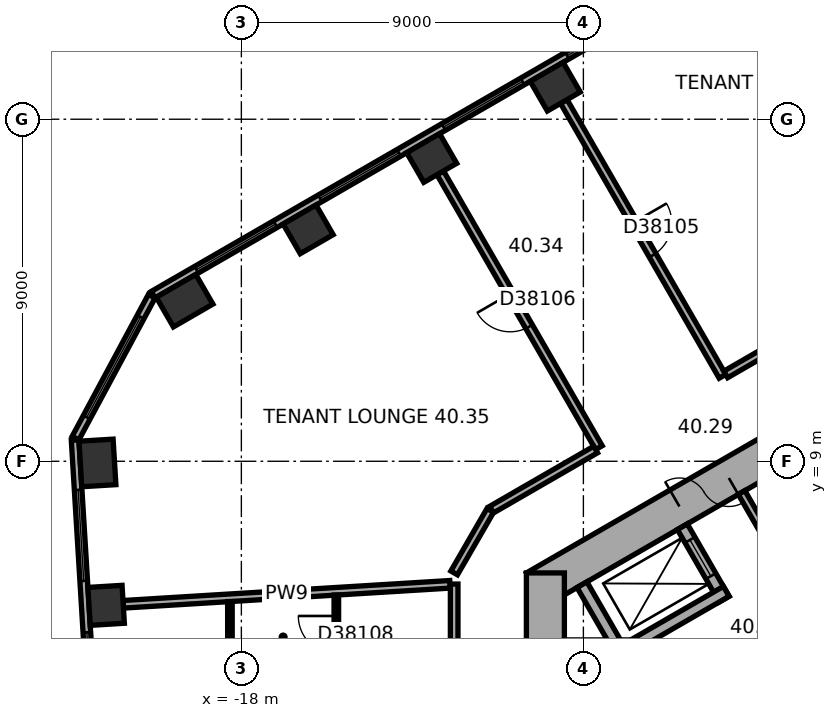
"""IFC4 building model, lengths in metres.
Left out: names, types, materials, properties, quantities, classifications, styles, units other than length and angle.
Written with IfcOpenShell. Run it as: python <this file> out.ifc"""

import sys

from ifc_helpers import new_model, si_unit, direction, frame, frame_2d, origin, origin_2d, place, context, subcontext, project, spatial, rectangle, extrude, element, fill, save


model = new_model("IFC4")
c1 = context("Model", 3, precision=1e-05, world=origin(), true_north=direction((0.0, 1.0)))
c2 = subcontext(c1, "Body", "Model", "MODEL_VIEW")
j1 = project(units=[si_unit("LENGTHUNIT", "METRE"), si_unit("PLANEANGLEUNIT", "RADIAN")], contexts=[c1])
p1 = place(None, origin())
s1 = spatial("IfcSite", under=j1, at=p1, CompositionType="ELEMENT")
p2 = place(p1, origin())
s2 = spatial("IfcBuilding", under=s1, at=p2, CompositionType="ELEMENT")
p3 = place(p2, frame((0.0, 0.0, 165.1)))
s3 = spatial("IfcBuildingStorey", under=s2, at=p3, CompositionType="ELEMENT", Elevation=165.1)
for number, where, z_axis, x_axis in (
    (1, (-9.74, 18.856, 0.0), (0.0, 0.0, 1.0), (-0.866, -0.5, 0.0)),
    (2, (-12.991, 16.979, 0.0), (0.0, 0.0, 1.0), (-0.866, -0.5, 0.0)),
    (3, (-16.242, 15.102, 0.0), (0.0, 0.0, 1.0), (-0.866, -0.5, 0.0)),
):
    element("IfcColumn", number, at=place(p3, frame(where, z_axis=z_axis, x_axis=x_axis)), inside=s3, PredefinedType="COLUMN", context=c2, shape_type="SweptSolid", body=[
        extrude(rectangle(XDim=1.0, YDim=0.9, at=origin_2d()), origin(), (0.0, 0.0, 1.0), 3.7),
    ])
for number, where, z_axis, x_axis in (
    (4, (-19.494, 13.225, 0.0), (0.0, 0.0, 1.0), (-0.866, -0.5, 0.0)),
    (5, (-21.787, 8.956, 0.0), (0.0, 0.0, 1.0), (0.061, -0.998, 0.0)),
):
    element("IfcColumn", number, at=place(p3, frame(where, z_axis=z_axis, x_axis=x_axis)), inside=s3, PredefinedType="COLUMN", context=c2, shape_type="SweptSolid", body=[
        extrude(rectangle(XDim=1.2, YDim=0.9, at=origin_2d()), origin(), (0.0, 0.0, 1.0), 3.7),
    ])
p4 = place(p3, frame((-21.558, 5.209, 0.0), z_axis=(0.0, 0.0, 1.0), x_axis=(0.061048539535, -0.998134798422, 0.0)))
e6 = element("IfcColumn", 6, at=p4, inside=s3, PredefinedType="COLUMN", context=c2, shape_type="SweptSolid", body=[
    extrude(rectangle(XDim=1.0, YDim=0.9, at=origin_2d()), origin(), (0.0, 0.0, 1.0), 3.7),
])
p5 = place(p3, frame((0.25, 11.691, 0.0), z_axis=(0.0, 0.0, 1.0), x_axis=(-0.866022616891, -0.50000482701, 0.0)))
e7 = element("IfcWall", 7, at=p5, inside=s3, PredefinedType="SHEAR", context=c2, shape_type="SweptSolid", body=[
    extrude(rectangle(XDim=12.125, YDim=1.0, at=frame_2d((6.062, 0.0))), origin(), (0.0, 0.0, 1.0), 3.7),
])
p6 = place(p5, frame((6.262, 0.0, 0.0)))
e8 = element("IfcOpeningElement", 8, at=p6, cuts=e7, PredefinedType="OPENING", context=c2, shape_type="SweptSolid", body=[
    extrude(rectangle(XDim=1.5, YDim=2.1, at=frame_2d((0.75, 1.05))), frame((0.0, 0.51, 0.0), z_axis=(0.0, -1.0, 0.0), x_axis=(1.0, 0.0, 0.0)), (0.0, 0.0, 1.0), 1.02),
])
p7 = place(p5, frame((3.112, 0.0, 0.0)))
e9 = element("IfcOpeningElement", 9, at=p7, cuts=e7, PredefinedType="OPENING", context=c2, shape_type="SweptSolid", body=[
    extrude(rectangle(XDim=0.9, YDim=2.1, at=frame_2d((0.45, 1.05))), frame((0.0, 0.51, 0.0), z_axis=(0.0, -1.0, 0.0), x_axis=(1.0, 0.0, 0.0)), (0.0, 0.0, 1.0), 1.02),
])
p8 = place(p3, frame((-10.0, 6.062, 0.0), z_axis=(0.0, 0.0, 1.0), x_axis=(0.0, -1.0, 0.0)))
e10 = element("IfcWall", 10, at=p8, inside=s3, PredefinedType="SHEAR", context=c2, shape_type="SweptSolid", body=[
    extrude(rectangle(XDim=12.125, YDim=1.0, at=frame_2d((6.062, 0.0))), origin(), (0.0, 0.0, 1.0), 3.7),
])
p9 = place(p8, frame((5.212, 0.0, 0.0)))
e11 = element("IfcOpeningElement", 11, at=p9, cuts=e10, PredefinedType="OPENING", context=c2, shape_type="SweptSolid", body=[
    extrude(rectangle(XDim=1.1, YDim=2.1, at=frame_2d((0.55, 1.05))), frame((0.0, 0.51, 0.0), z_axis=(0.0, -1.0, 0.0), x_axis=(1.0, 0.0, 0.0)), (0.0, 0.0, 1.0), 1.02),
])
p10 = place(p8, frame((7.812, 0.0, 0.0)))
e12 = element("IfcOpeningElement", 12, at=p10, cuts=e10, PredefinedType="OPENING", context=c2, shape_type="SweptSolid", body=[
    extrude(rectangle(XDim=1.1, YDim=2.1, at=frame_2d((0.55, 1.05))), frame((0.0, 0.51, 0.0), z_axis=(0.0, -1.0, 0.0), x_axis=(1.0, 0.0, 0.0)), (0.0, 0.0, 1.0), 1.02),
])
p11 = place(p3, frame((-2.961, 23.405, 0.0), z_axis=(0.0, 0.0, 1.0), x_axis=(-0.866023315909, -0.500003616288, 0.0)))
e13 = element("IfcWall", 13, at=p11, inside=s3, PredefinedType="STANDARD", context=c2, shape_type="SweptSolid", body=[
    extrude(rectangle(XDim=20.044, YDim=0.2, at=frame_2d((10.022, 0.0))), origin(), (0.0, 0.0, 1.0), 3.7),
])
p12 = place(p11, frame((1.314, 0.0, 0.9)))
e14 = element("IfcOpeningElement", 14, at=p12, cuts=e13, PredefinedType="OPENING", context=c2, shape_type="SweptSolid", body=[
    extrude(rectangle(XDim=2.4, YDim=2.0, at=frame_2d((1.2, 1.0))), frame((0.0, 0.11, 0.0), z_axis=(0.0, -1.0, 0.0), x_axis=(1.0, 0.0, 0.0)), (0.0, 0.0, 1.0), 0.22),
])
p13 = place(p11, frame((5.069, 0.0, 0.9)))
e15 = element("IfcOpeningElement", 15, at=p13, cuts=e13, PredefinedType="OPENING", context=c2, shape_type="SweptSolid", body=[
    extrude(rectangle(XDim=2.4, YDim=2.0, at=frame_2d((1.2, 1.0))), frame((0.0, 0.11, 0.0), z_axis=(0.0, -1.0, 0.0), x_axis=(1.0, 0.0, 0.0)), (0.0, 0.0, 1.0), 0.22),
])
p14 = place(p11, frame((8.823, 0.0, 0.9)))
e16 = element("IfcOpeningElement", 16, at=p14, cuts=e13, PredefinedType="OPENING", context=c2, shape_type="SweptSolid", body=[
    extrude(rectangle(XDim=2.4, YDim=2.0, at=frame_2d((1.2, 1.0))), frame((0.0, 0.11, 0.0), z_axis=(0.0, -1.0, 0.0), x_axis=(1.0, 0.0, 0.0)), (0.0, 0.0, 1.0), 0.22),
])
p15 = place(p11, frame((12.577, 0.0, 0.9)))
e17 = element("IfcOpeningElement", 17, at=p15, cuts=e13, PredefinedType="OPENING", context=c2, shape_type="SweptSolid", body=[
    extrude(rectangle(XDim=2.4, YDim=2.0, at=frame_2d((1.2, 1.0))), frame((0.0, 0.11, 0.0), z_axis=(0.0, -1.0, 0.0), x_axis=(1.0, 0.0, 0.0)), (0.0, 0.0, 1.0), 0.22),
])
p16 = place(p11, frame((16.331, 0.0, 0.9)))
e18 = element("IfcOpeningElement", 18, at=p16, cuts=e13, PredefinedType="OPENING", context=c2, shape_type="SweptSolid", body=[
    extrude(rectangle(XDim=2.4, YDim=2.0, at=frame_2d((1.2, 1.0))), frame((0.0, 0.11, 0.0), z_axis=(0.0, -1.0, 0.0), x_axis=(1.0, 0.0, 0.0)), (0.0, 0.0, 1.0), 0.22),
])
p17 = place(p3, frame((-20.357, 13.344, 0.0), z_axis=(0.0, 0.0, 1.0), x_axis=(-0.473288913494, -0.880907262068, 0.0)))
e19 = element("IfcWall", 19, at=p17, inside=s3, PredefinedType="STANDARD", context=c2, shape_type="SweptSolid", body=[
    extrude(rectangle(XDim=4.238, YDim=0.2, at=frame_2d((2.119, 0.0))), origin(), (0.0, 0.0, 1.0), 3.7),
])
p18 = place(p17, frame((0.619, 0.0, 0.9)))
e20 = element("IfcOpeningElement", 20, at=p18, cuts=e19, PredefinedType="OPENING", context=c2, shape_type="SweptSolid", body=[
    extrude(rectangle(XDim=3.0, YDim=2.0, at=frame_2d((1.5, 1.0))), frame((0.0, 0.11, 0.0), z_axis=(0.0, -1.0, 0.0), x_axis=(1.0, 0.0, 0.0)), (0.0, 0.0, 1.0), 0.22),
])
p19 = place(p3, frame((-22.375, 9.557, 0.0), z_axis=(0.0, 0.0, 1.0), x_axis=(0.061036015339, -0.998135564356, 0.0)))
e21 = element("IfcWall", 21, at=p19, inside=s3, PredefinedType="STANDARD", context=c2, shape_type="SweptSolid", body=[
    extrude(rectangle(XDim=20.044, YDim=0.2, at=frame_2d((10.022, 0.0))), origin(), (0.0, 0.0, 1.0), 3.7),
])
p20 = place(p19, frame((1.313, 0.0, 0.9)))
e22 = element("IfcOpeningElement", 22, at=p20, cuts=e21, PredefinedType="OPENING", context=c2, shape_type="SweptSolid", body=[
    extrude(rectangle(XDim=2.4, YDim=2.0, at=frame_2d((1.2, 1.0))), frame((0.0, 0.11, 0.0), z_axis=(0.0, -1.0, 0.0), x_axis=(1.0, 0.0, 0.0)), (0.0, 0.0, 1.0), 0.22),
])
p21 = place(p19, frame((5.067, 0.0, 0.9)))
e23 = element("IfcOpeningElement", 23, at=p21, cuts=e21, PredefinedType="OPENING", context=c2, shape_type="SweptSolid", body=[
    extrude(rectangle(XDim=2.4, YDim=2.0, at=frame_2d((1.2, 1.0))), frame((0.0, 0.11, 0.0), z_axis=(0.0, -1.0, 0.0), x_axis=(1.0, 0.0, 0.0)), (0.0, 0.0, 1.0), 0.22),
])
p22 = place(p19, frame((8.821, 0.0, 0.9)))
e24 = element("IfcOpeningElement", 24, at=p22, cuts=e21, PredefinedType="OPENING", context=c2, shape_type="SweptSolid", body=[
    extrude(rectangle(XDim=2.4, YDim=2.0, at=frame_2d((1.2, 1.0))), frame((0.0, 0.11, 0.0), z_axis=(0.0, -1.0, 0.0), x_axis=(1.0, 0.0, 0.0)), (0.0, 0.0, 1.0), 0.22),
])
p23 = place(p19, frame((12.575, 0.0, 0.9)))
e25 = element("IfcOpeningElement", 25, at=p23, cuts=e21, PredefinedType="OPENING", context=c2, shape_type="SweptSolid", body=[
    extrude(rectangle(XDim=2.4, YDim=2.0, at=frame_2d((1.2, 1.0))), frame((0.0, 0.11, 0.0), z_axis=(0.0, -1.0, 0.0), x_axis=(1.0, 0.0, 0.0)), (0.0, 0.0, 1.0), 0.22),
])
p24 = place(p19, frame((16.329, 0.0, 0.9)))
e26 = element("IfcOpeningElement", 26, at=p24, cuts=e21, PredefinedType="OPENING", context=c2, shape_type="SweptSolid", body=[
    extrude(rectangle(XDim=2.4, YDim=2.0, at=frame_2d((1.2, 1.0))), frame((0.0, 0.11, 0.0), z_axis=(0.0, -1.0, 0.0), x_axis=(1.0, 0.0, 0.0)), (0.0, 0.0, 1.0), 0.22),
])
p25 = place(p3, frame((-3.737, 6.272, 0.0), z_axis=(0.0, 0.0, 1.0), x_axis=(-0.50002983664, 0.866008176907, 0.0)))
e27 = element("IfcWall", 27, at=p25, inside=s3, PredefinedType="PARTITIONING", context=c2, shape_type="SweptSolid", body=[
    extrude(rectangle(XDim=2.2, YDim=0.2, at=frame_2d((1.1, 0.0))), origin(), (0.0, 0.0, 1.0), 3.42),
])
p26 = place(p3, frame((-5.295, 5.372, 0.0), z_axis=(0.0, 0.0, 1.0), x_axis=(-0.500077893725, 0.86598042715, 0.0)))
e28 = element("IfcWall", 28, at=p26, inside=s3, PredefinedType="SHEAR", context=c2, shape_type="SweptSolid", body=[
    extrude(rectangle(XDim=2.2, YDim=0.3, at=frame_2d((1.1, 0.0))), origin(), (0.0, 0.0, 1.0), 3.42),
])
p27 = place(p26, frame((0.7, 0.0, 0.0)))
e29 = element("IfcOpeningElement", 29, at=p27, cuts=e28, PredefinedType="OPENING", context=c2, shape_type="SweptSolid", body=[
    extrude(rectangle(XDim=1.1, YDim=2.1, at=frame_2d((0.55, 1.05))), frame((0.0, 0.16, 0.0), z_axis=(0.0, -1.0, 0.0), x_axis=(1.0, 0.0, 0.0)), (0.0, 0.0, 1.0), 0.32),
])
p28 = place(p3, frame((-5.24, 5.577, 0.0), z_axis=(0.0, 0.0, 1.0), x_axis=(-0.866014461049, -0.500018952895, 0.0)))
e30 = element("IfcWall", 30, at=p28, inside=s3, PredefinedType="SHEAR", context=c2, shape_type="SweptSolid", body=[
    extrude(rectangle(XDim=3.35, YDim=0.3, at=frame_2d((1.675, 0.0))), origin(), (0.0, 0.0, 1.0), 3.42),
])
p29 = place(p3, frame((-7.937, 3.847, 0.0), z_axis=(0.0, 0.0, 1.0), x_axis=(-0.50002983664, 0.866008176907, 0.0)))
e31 = element("IfcWall", 31, at=p29, inside=s3, PredefinedType="SHEAR", context=c2, shape_type="SweptSolid", body=[
    extrude(rectangle(XDim=2.2, YDim=0.3, at=frame_2d((1.1, 0.0))), origin(), (0.0, 0.0, 1.0), 3.42),
])
p30 = place(p3, frame((-21.109, 5.237, 0.0), z_axis=(0.0, 0.0, 1.0), x_axis=(0.998135264293, 0.061040922131, 0.0)))
e32 = element("IfcWall", 32, at=p30, inside=s3, PredefinedType="PARTITIONING", context=c2, shape_type="SweptSolid", body=[
    extrude(rectangle(XDim=8.615, YDim=0.2, at=frame_2d((4.308, 0.0))), origin(), (0.0, 0.0, 1.0), 3.42),
])
p31 = place(p3, frame((-18.301, 5.308, 0.0), z_axis=(0.0, 0.0, 1.0), x_axis=(0.0, -1.0, 0.0)))
e33 = element("IfcWall", 33, at=p31, inside=s3, PredefinedType="PARTITIONING", context=c2, shape_type="SweptSolid", body=[
    extrude(rectangle(XDim=1.869, YDim=0.12, at=frame_2d((0.934, 0.0))), origin(), (0.0, 0.0, 1.0), 3.42),
])
p32 = place(p3, frame((-15.501, 5.479, 0.0), z_axis=(0.0, 0.0, 1.0), x_axis=(0.0, -1.0, 0.0)))
e34 = element("IfcWall", 34, at=p32, inside=s3, PredefinedType="PARTITIONING", context=c2, shape_type="SweptSolid", body=[
    extrude(rectangle(XDim=7.322, YDim=0.12, at=frame_2d((3.661, 0.0))), origin(), (0.0, 0.0, 1.0), 3.42),
])
p33 = place(p32, frame((0.55, 0.0, 0.0)))
e35 = element("IfcOpeningElement", 35, at=p33, cuts=e34, PredefinedType="OPENING", context=c2, shape_type="SweptSolid", body=[
    extrude(rectangle(XDim=1.0, YDim=2.1, at=frame_2d((0.5, 1.05))), frame((0.0, 0.07, 0.0), z_axis=(0.0, -1.0, 0.0), x_axis=(1.0, 0.0, 0.0)), (0.0, 0.0, 1.0), 0.14),
])
p34 = place(p32, frame((2.736, 0.0, 0.0)))
e36 = element("IfcOpeningElement", 36, at=p34, cuts=e34, PredefinedType="OPENING", context=c2, shape_type="SweptSolid", body=[
    extrude(rectangle(XDim=0.9, YDim=2.1, at=frame_2d((0.45, 1.05))), frame((0.0, 0.07, 0.0), z_axis=(0.0, -1.0, 0.0), x_axis=(1.0, 0.0, 0.0)), (0.0, 0.0, 1.0), 0.14),
])
p35 = place(p32, frame((5.347, 0.0, 0.0)))
e37 = element("IfcOpeningElement", 37, at=p35, cuts=e34, PredefinedType="OPENING", context=c2, shape_type="SweptSolid", body=[
    extrude(rectangle(XDim=0.9, YDim=2.1, at=frame_2d((0.45, 1.05))), frame((0.0, 0.07, 0.0), z_axis=(0.0, -1.0, 0.0), x_axis=(1.0, 0.0, 0.0)), (0.0, 0.0, 1.0), 0.14),
])
p36 = place(p3, frame((-12.766, 16.589, 0.0), z_axis=(0.0, 0.0, 1.0), x_axis=(0.500010139422, -0.866019549707, 0.0)))
e38 = element("IfcWall", 38, at=p36, inside=s3, PredefinedType="PARTITIONING", context=c2, shape_type="SweptSolid", body=[
    extrude(rectangle(XDim=8.35, YDim=0.2, at=frame_2d((4.175, 0.0))), origin(), (0.0, 0.0, 1.0), 3.42),
])
p37 = place(p36, frame((3.675, 0.0, 0.0)))
e39 = element("IfcOpeningElement", 39, at=p37, cuts=e38, PredefinedType="OPENING", context=c2, shape_type="SweptSolid", body=[
    extrude(rectangle(XDim=1.0, YDim=2.1, at=frame_2d((0.5, 1.05))), frame((0.0, 0.11, 0.0), z_axis=(0.0, -1.0, 0.0), x_axis=(1.0, 0.0, 0.0)), (0.0, 0.0, 1.0), 0.22),
])
p38 = place(p3, frame((-12.4, 5.769, 0.0), z_axis=(0.0, 0.0, 1.0), x_axis=(0.0, -1.0, 0.0)))
e40 = element("IfcWall", 40, at=p38, inside=s3, PredefinedType="PARTITIONING", context=c2, shape_type="SweptSolid", body=[
    extrude(rectangle(XDim=3.568, YDim=0.2, at=frame_2d((1.784, 0.0))), origin(), (0.0, 0.0, 1.0), 3.42),
])
p39 = place(p3, frame((-11.45, 7.708, 0.0), z_axis=(0.0, 0.0, 1.0), x_axis=(-0.500022797313, -0.86601224135, 0.0)))
e41 = element("IfcWall", 41, at=p39, inside=s3, PredefinedType="PARTITIONING", context=c2, shape_type="SweptSolid", body=[
    extrude(rectangle(XDim=1.9, YDim=0.2, at=frame_2d((0.95, 0.0))), origin(), (0.0, 0.0, 1.0), 3.42),
])
p40 = place(p3, frame((-9.515, 18.466, 0.0), z_axis=(0.0, 0.0, 1.0), x_axis=(0.500010139422, -0.866019549707, 0.0)))
e42 = element("IfcWall", 42, at=p40, inside=s3, PredefinedType="PARTITIONING", context=c2, shape_type="SweptSolid", body=[
    extrude(rectangle(XDim=8.35, YDim=0.2, at=frame_2d((4.175, 0.0))), origin(), (0.0, 0.0, 1.0), 2.87),
])
p41 = place(p40, frame((3.675, 0.0, 0.0)))
e43 = element("IfcOpeningElement", 43, at=p41, cuts=e42, PredefinedType="OPENING", context=c2, shape_type="SweptSolid", body=[
    extrude(rectangle(XDim=1.0, YDim=2.1, at=frame_2d((0.5, 1.05))), frame((0.0, 0.11, 0.0), z_axis=(0.0, -1.0, 0.0), x_axis=(1.0, 0.0, 0.0)), (0.0, 0.0, 1.0), 0.22),
])
p42 = place(p3, frame((-8.678, 9.308, 0.0), z_axis=(0.0, 0.0, 1.0), x_axis=(-0.866000359435, -0.500043375578, 0.0)))
e44 = element("IfcWall", 44, at=p42, inside=s3, PredefinedType="PARTITIONING", context=c2, shape_type="SweptSolid", body=[
    extrude(rectangle(XDim=3.161, YDim=0.2, at=frame_2d((1.581, 0.0))), origin(), (0.0, 0.0, 1.0), 3.42),
])
p43 = place(p3, frame((-0.95, 13.77, 0.0), z_axis=(0.0, 0.0, 1.0), x_axis=(-0.866036689987, -0.499980451214, 0.0)))
e45 = element("IfcWall", 45, at=p43, inside=s3, PredefinedType="PARTITIONING", context=c2, shape_type="SweptSolid", body=[
    extrude(rectangle(XDim=4.969, YDim=0.2, at=frame_2d((2.485, 0.0))), origin(), (0.0, 0.0, 1.0), 3.42),
])
p44 = place(p13, origin())
e46 = element("IfcWindow", 46, at=p44, inside=s3, PartitioningType="SINGLE_PANEL", PredefinedType="WINDOW", context=c2, shape_type="SweptSolid", body=[
    extrude(rectangle(XDim=2.4, YDim=2.0, at=frame_2d((1.2, 1.0))), frame((0.0, 0.03, 0.0), z_axis=(0.0, -1.0, 0.0), x_axis=(1.0, 0.0, 0.0)), (0.0, 0.0, 1.0), 0.06),
])
fill(e15, e46)
p45 = place(p14, origin())
e47 = element("IfcWindow", 47, at=p45, inside=s3, PartitioningType="SINGLE_PANEL", PredefinedType="WINDOW", context=c2, shape_type="SweptSolid", body=[
    extrude(rectangle(XDim=2.4, YDim=2.0, at=frame_2d((1.2, 1.0))), frame((0.0, 0.03, 0.0), z_axis=(0.0, -1.0, 0.0), x_axis=(1.0, 0.0, 0.0)), (0.0, 0.0, 1.0), 0.06),
])
fill(e16, e47)
p46 = place(p15, origin())
e48 = element("IfcWindow", 48, at=p46, inside=s3, PartitioningType="SINGLE_PANEL", PredefinedType="WINDOW", context=c2, shape_type="SweptSolid", body=[
    extrude(rectangle(XDim=2.4, YDim=2.0, at=frame_2d((1.2, 1.0))), frame((0.0, 0.03, 0.0), z_axis=(0.0, -1.0, 0.0), x_axis=(1.0, 0.0, 0.0)), (0.0, 0.0, 1.0), 0.06),
])
fill(e17, e48)
p47 = place(p16, origin())
e49 = element("IfcWindow", 49, at=p47, inside=s3, PartitioningType="SINGLE_PANEL", PredefinedType="WINDOW", context=c2, shape_type="SweptSolid", body=[
    extrude(rectangle(XDim=2.4, YDim=2.0, at=frame_2d((1.2, 1.0))), frame((0.0, 0.03, 0.0), z_axis=(0.0, -1.0, 0.0), x_axis=(1.0, 0.0, 0.0)), (0.0, 0.0, 1.0), 0.06),
])
fill(e18, e49)
p48 = place(p18, origin())
e50 = element("IfcWindow", 50, at=p48, inside=s3, PartitioningType="SINGLE_PANEL", PredefinedType="WINDOW", context=c2, shape_type="SweptSolid", body=[
    extrude(rectangle(XDim=3.0, YDim=2.0, at=frame_2d((1.5, 1.0))), frame((0.0, 0.03, 0.0), z_axis=(0.0, -1.0, 0.0), x_axis=(1.0, 0.0, 0.0)), (0.0, 0.0, 1.0), 0.06),
])
fill(e20, e50)
p49 = place(p20, origin())
e51 = element("IfcWindow", 51, at=p49, inside=s3, PartitioningType="SINGLE_PANEL", PredefinedType="WINDOW", context=c2, shape_type="SweptSolid", body=[
    extrude(rectangle(XDim=2.4, YDim=2.0, at=frame_2d((1.2, 1.0))), frame((0.0, 0.03, 0.0), z_axis=(0.0, -1.0, 0.0), x_axis=(1.0, 0.0, 0.0)), (0.0, 0.0, 1.0), 0.06),
])
fill(e22, e51)
p50 = place(p21, origin())
e52 = element("IfcWindow", 52, at=p50, inside=s3, PartitioningType="SINGLE_PANEL", PredefinedType="WINDOW", context=c2, shape_type="SweptSolid", body=[
    extrude(rectangle(XDim=2.4, YDim=2.0, at=frame_2d((1.2, 1.0))), frame((0.0, 0.03, 0.0), z_axis=(0.0, -1.0, 0.0), x_axis=(1.0, 0.0, 0.0)), (0.0, 0.0, 1.0), 0.06),
])
fill(e23, e52)
p51 = place(p6, origin())
e53 = element("IfcDoor", 53, at=p51, inside=s3, OperationType="DOUBLE_DOOR_SINGLE_SWING", PredefinedType="DOOR", context=c2, shape_type="SweptSolid", body=[
    extrude(rectangle(XDim=1.5, YDim=2.1, at=frame_2d((0.75, 1.05))), frame((0.0, 0.025, 0.0), z_axis=(0.0, -1.0, 0.0), x_axis=(1.0, 0.0, 0.0)), (0.0, 0.0, 1.0), 0.05),
])
fill(e8, e53)
p52 = place(p27, origin())
e54 = element("IfcDoor", 54, at=p52, inside=s3, OperationType="DOUBLE_DOOR_SLIDING", PredefinedType="DOOR", context=c2, shape_type="SweptSolid", body=[
    extrude(rectangle(XDim=1.1, YDim=2.1, at=frame_2d((0.55, 1.05))), frame((0.0, 0.025, 0.0), z_axis=(0.0, -1.0, 0.0), x_axis=(1.0, 0.0, 0.0)), (0.0, 0.0, 1.0), 0.05),
])
fill(e29, e54)
p53 = place(p41, origin())
e55 = element("IfcDoor", 55, at=p53, inside=s3, OperationType="SINGLE_SWING_LEFT", PredefinedType="DOOR", context=c2, shape_type="SweptSolid", body=[
    extrude(rectangle(XDim=1.0, YDim=2.1, at=frame_2d((0.5, 1.05))), frame((0.0, 0.025, 0.0), z_axis=(0.0, -1.0, 0.0), x_axis=(1.0, 0.0, 0.0)), (0.0, 0.0, 1.0), 0.05),
])
fill(e43, e55)
p54 = place(p37, origin())
e56 = element("IfcDoor", 56, at=p54, inside=s3, OperationType="SINGLE_SWING_LEFT", PredefinedType="DOOR", context=c2, shape_type="SweptSolid", body=[
    extrude(rectangle(XDim=1.0, YDim=2.1, at=frame_2d((0.5, 1.05))), frame((0.0, 0.025, 0.0), z_axis=(0.0, -1.0, 0.0), x_axis=(1.0, 0.0, 0.0)), (0.0, 0.0, 1.0), 0.05),
])
fill(e39, e56)
p55 = place(p33, origin())
e57 = element("IfcDoor", 57, at=p55, inside=s3, OperationType="SINGLE_SWING_LEFT", PredefinedType="DOOR", context=c2, shape_type="SweptSolid", body=[
    extrude(rectangle(XDim=1.0, YDim=2.1, at=frame_2d((0.5, 1.05))), frame((0.0, 0.025, 0.0), z_axis=(0.0, -1.0, 0.0), x_axis=(1.0, 0.0, 0.0)), (0.0, 0.0, 1.0), 0.05),
])
fill(e35, e57)
save(model, sys.argv[1])
